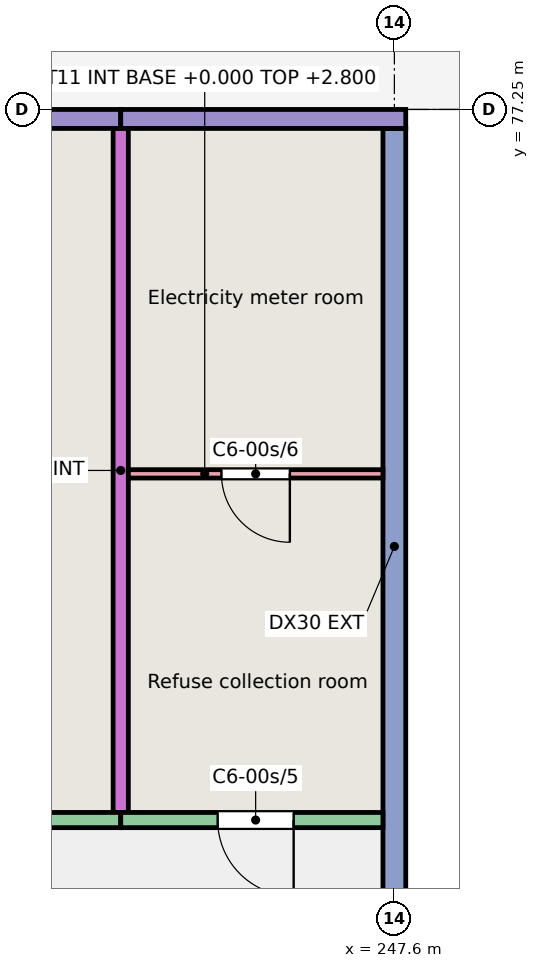
"""IFC4 building model, lengths in metres.
Left out: names, types, materials, properties, quantities, classifications, styles, units other than length and angle.
Written with IfcOpenShell. Run it as: python <this file> out.ifc"""

import sys

from ifc_helpers import new_model, si_unit, direction, frame, frame_2d, origin, place, context, subcontext, project, spatial, rectangle, extrude, element, fill, save


model = new_model("IFC4")
c1 = context("Model", 3, precision=1e-05, world=origin(), true_north=direction((0.0, 1.0)))
c2 = subcontext(c1, "Body", "Model", "MODEL_VIEW")
j1 = project(units=[si_unit("LENGTHUNIT", "METRE"), si_unit("PLANEANGLEUNIT", "RADIAN")], contexts=[c1])
p1 = place(None, origin())
s1 = spatial("IfcSite", under=j1, at=p1, CompositionType="ELEMENT")
p2 = place(p1, origin())
s2 = spatial("IfcBuilding", under=s1, at=p2, CompositionType="ELEMENT")
p3 = place(p2, origin())
s3 = spatial("IfcBuildingStorey", under=s2, at=p3, CompositionType="ELEMENT", Elevation=0.0)
p4 = place(p3, frame((244.0, 68.0, -0.25), z_axis=(0.0, 0.0, 1.0), x_axis=(0.0, 1.0, 0.0)))
e1 = element("IfcWall", 1, at=p4, inside=s3, PredefinedType="SHEAR", context=c2, shape_type="SweptSolid", body=[
    extrude(rectangle(XDim=9.0, YDim=0.2, at=frame_2d((4.5, 0.0))), origin(), (0.0, 0.0, 1.0), 3.25),
])
p5 = place(p3, frame((247.6, 66.0, -0.25), z_axis=(0.0, 0.0, 1.0), x_axis=(0.0, 1.0, 0.0)))
e2 = element("IfcWall", 2, at=p5, inside=s3, PredefinedType="SHEAR", context=c2, shape_type="SweptSolid", body=[
    extrude(rectangle(XDim=11.0, YDim=0.3, at=frame_2d((5.5, 0.0))), origin(), (0.0, 0.0, 1.0), 3.25),
])
p6 = place(p3, frame((240.4, 77.125, -0.25), z_axis=(0.0, 0.0, 1.0), x_axis=(1.0, 0.0, 0.0)))
e3 = element("IfcWall", 3, at=p6, inside=s3, PredefinedType="SOLIDWALL", context=c2, shape_type="SweptSolid", body=[
    extrude(rectangle(XDim=3.6, YDim=0.25, at=frame_2d((1.8, 0.0))), origin(), (0.0, 0.0, 1.0), 3.25),
])
p7 = place(p6, frame((1.312, 0.0, 0.25)))
e4 = element("IfcOpeningElement", 4, at=p7, cuts=e3, PredefinedType="OPENING", context=c2, shape_type="SweptSolid", body=[
    extrude(rectangle(XDim=1.0, YDim=2.1, at=frame_2d((0.5, 1.05))), frame((0.0, 0.135, 0.0), z_axis=(0.0, -1.0, 0.0), x_axis=(1.0, 0.0, 0.0)), (0.0, 0.0, 1.0), 0.27),
])
p8 = place(p3, frame((240.4, 67.9, -0.25), z_axis=(0.0, 0.0, 1.0), x_axis=(1.0, 0.0, 0.0)))
e5 = element("IfcWall", 5, at=p8, inside=s3, PredefinedType="SOLIDWALL", context=c2, shape_type="SweptSolid", body=[
    extrude(rectangle(XDim=3.6, YDim=0.2, at=frame_2d((1.8, 0.0))), origin(), (0.0, 0.0, 1.0), 3.25),
])
p9 = place(p8, frame((1.312, 0.0, 0.25)))
e6 = element("IfcOpeningElement", 6, at=p9, cuts=e5, PredefinedType="OPENING", context=c2, shape_type="SweptSolid", body=[
    extrude(rectangle(XDim=1.0, YDim=2.1, at=frame_2d((0.5, 1.05))), frame((0.0, 0.11, 0.0), z_axis=(0.0, -1.0, 0.0), x_axis=(1.0, 0.0, 0.0)), (0.0, 0.0, 1.0), 0.22),
])
p10 = place(p3, frame((244.0, 77.125, -0.25), z_axis=(0.0, 0.0, 1.0), x_axis=(1.0, 0.0, 0.0)))
e7 = element("IfcWall", 7, at=p10, inside=s3, PredefinedType="SOLIDWALL", context=c2, shape_type="SweptSolid", body=[
    extrude(rectangle(XDim=3.75, YDim=0.25, at=frame_2d((1.875, 0.0))), origin(), (0.0, 0.0, 1.0), 3.25),
])
p11 = place(p3, frame((244.0, 67.9, -0.25), z_axis=(0.0, 0.0, 1.0), x_axis=(1.0, 0.0, 0.0)))
e8 = element("IfcWall", 8, at=p11, inside=s3, PredefinedType="SOLIDWALL", context=c2, shape_type="SweptSolid", body=[
    extrude(rectangle(XDim=3.45, YDim=0.2, at=frame_2d((1.725, 0.0))), origin(), (0.0, 0.0, 1.0), 3.25),
])
p12 = place(p11, frame((1.275, 0.0, 0.25)))
e9 = element("IfcOpeningElement", 9, at=p12, cuts=e8, PredefinedType="OPENING", context=c2, shape_type="SweptSolid", body=[
    extrude(rectangle(XDim=1.0, YDim=2.1, at=frame_2d((0.5, 1.05))), frame((0.0, 0.11, 0.0), z_axis=(0.0, -1.0, 0.0), x_axis=(1.0, 0.0, 0.0)), (0.0, 0.0, 1.0), 0.22),
])
p13 = place(p3, frame((244.1, 72.455, 0.0), z_axis=(0.0, 0.0, 1.0), x_axis=(1.0, 0.0, 0.0)))
e10 = element("IfcWall", 10, at=p13, inside=s3, PredefinedType="PARTITIONING", context=c2, shape_type="SweptSolid", body=[
    extrude(rectangle(XDim=3.35, YDim=0.11, at=frame_2d((1.675, 0.0))), origin(), (0.0, 0.0, 1.0), 2.8),
])
p14 = place(p13, frame((1.225, 0.0, 0.0)))
e11 = element("IfcOpeningElement", 11, at=p14, cuts=e10, PredefinedType="OPENING", context=c2, shape_type="SweptSolid", body=[
    extrude(rectangle(XDim=0.9, YDim=2.1, at=frame_2d((0.45, 1.05))), frame((0.0, 0.065, 0.0), z_axis=(0.0, -1.0, 0.0), x_axis=(1.0, 0.0, 0.0)), (0.0, 0.0, 1.0), 0.13),
])
p15 = place(p12, origin())
e12 = element("IfcDoor", 12, at=p15, inside=s3, OperationType="SINGLE_SWING_RIGHT", PredefinedType="DOOR", context=c2, shape_type="SweptSolid", body=[
    extrude(rectangle(XDim=1.0, YDim=2.1, at=frame_2d((0.5, 1.05))), frame((0.0, 0.025, 0.0), z_axis=(0.0, -1.0, 0.0), x_axis=(1.0, 0.0, 0.0)), (0.0, 0.0, 1.0), 0.05),
])
fill(e9, e12)
p16 = place(p14, origin())
e13 = element("IfcDoor", 13, at=p16, inside=s3, OperationType="SINGLE_SWING_RIGHT", PredefinedType="DOOR", context=c2, shape_type="SweptSolid", body=[
    extrude(rectangle(XDim=0.9, YDim=2.1, at=frame_2d((0.45, 1.05))), frame((0.0, 0.025, 0.0), z_axis=(0.0, -1.0, 0.0), x_axis=(1.0, 0.0, 0.0)), (0.0, 0.0, 1.0), 0.05),
])
fill(e11, e13)
save(model, sys.argv[1])
